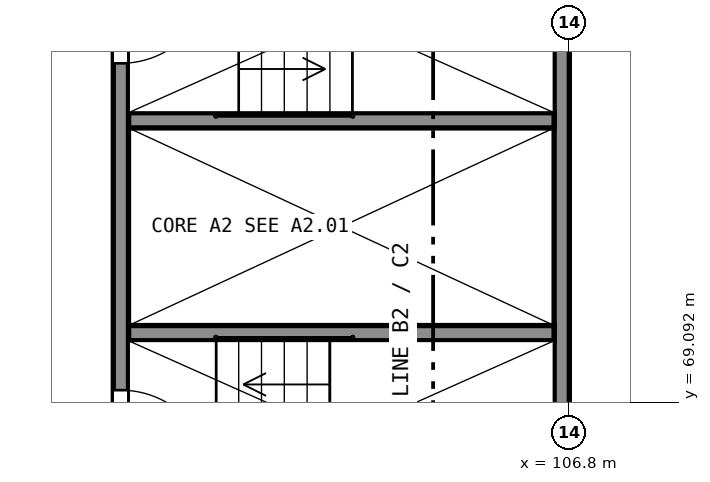
"""IFC4 building model, lengths in metres.
Left out: names, types, materials, properties, quantities, classifications, styles, units other than length and angle.
Written with IfcOpenShell. Run it as: python <this file> out.ifc"""

import sys

from ifc_helpers import new_model, si_unit, direction, frame, frame_2d, origin, place, context, subcontext, project, spatial, rectangle, extrude, element, fill, save


model = new_model("IFC4")
c1 = context("Model", 3, precision=1e-05, world=origin(), true_north=direction((0.0, 1.0)))
c2 = subcontext(c1, "Body", "Model", "MODEL_VIEW")
j1 = project(units=[si_unit("LENGTHUNIT", "METRE"), si_unit("PLANEANGLEUNIT", "RADIAN")], contexts=[c1])
p1 = place(None, origin())
s1 = spatial("IfcSite", under=j1, at=p1, CompositionType="ELEMENT")
p2 = place(p1, origin())
s2 = spatial("IfcBuilding", under=s1, at=p2, CompositionType="ELEMENT")
p3 = place(p2, frame((0.0, 0.0, 25.0)))
s3 = spatial("IfcBuildingStorey", under=s2, at=p3, CompositionType="ELEMENT", Elevation=25.0)
p4 = place(p3, frame((106.7, 67.4, 0.0), z_axis=(0.0, 0.0, 1.0), x_axis=(0.0, 1.0, 0.0)))
e1 = element("IfcWall", 1, at=p4, inside=s3, PredefinedType="SHEAR", context=c2, shape_type="SweptSolid", body=[
    extrude(rectangle(XDim=8.0, YDim=0.2, at=frame_2d((4.0, 0.0))), origin(), (0.0, 0.0, 1.0), 5.0),
])
p5 = place(p3, frame((100.9, 67.4, 0.0), z_axis=(0.0, 0.0, 1.0), x_axis=(0.0, 1.0, 0.0)))
e2 = element("IfcWall", 2, at=p5, inside=s3, PredefinedType="SHEAR", context=c2, shape_type="SweptSolid", body=[
    extrude(rectangle(XDim=8.0, YDim=0.2, at=frame_2d((4.0, 0.0))), origin(), (0.0, 0.0, 1.0), 5.0),
])
p6 = place(p5, frame((0.65, 0.0, 0.0)))
e3 = element("IfcOpeningElement", 3, at=p6, cuts=e2, PredefinedType="OPENING", context=c2, shape_type="SweptSolid", body=[
    extrude(rectangle(XDim=1.2, YDim=2.1, at=frame_2d((0.6, 1.05))), frame((0.0, 0.11, 0.0), z_axis=(0.0, -1.0, 0.0), x_axis=(1.0, 0.0, 0.0)), (0.0, 0.0, 1.0), 0.22),
])
p7 = place(p5, frame((6.15, 0.0, 0.0)))
e4 = element("IfcOpeningElement", 4, at=p7, cuts=e2, PredefinedType="OPENING", context=c2, shape_type="SweptSolid", body=[
    extrude(rectangle(XDim=1.2, YDim=2.1, at=frame_2d((0.6, 1.05))), frame((0.0, 0.11, 0.0), z_axis=(0.0, -1.0, 0.0), x_axis=(1.0, 0.0, 0.0)), (0.0, 0.0, 1.0), 0.22),
])
for number, where, z_axis, x_axis in (
    (5, (101.0, 70.0, 0.0), (0.0, 0.0, 1.0), (1.0, 0.0, 0.0)),
    (6, (101.0, 72.8, 0.0), (0.0, 0.0, 1.0), (1.0, 0.0, 0.0)),
):
    element("IfcWall", number, at=place(p3, frame(where, z_axis=z_axis, x_axis=x_axis)), inside=s3, PredefinedType="SHEAR", context=c2, shape_type="SweptSolid", body=[
        extrude(rectangle(XDim=5.6, YDim=0.2, at=frame_2d((2.8, 0.0))), origin(), (0.0, 0.0, 1.0), 5.0),
    ])
p8 = place(p6, origin())
e7 = element("IfcDoor", 7, at=p8, inside=s3, OperationType="SINGLE_SWING_LEFT", PredefinedType="DOOR", context=c2, shape_type="SweptSolid", body=[
    extrude(rectangle(XDim=1.2, YDim=2.1, at=frame_2d((0.6, 1.05))), frame((0.0, 0.025, 0.0), z_axis=(0.0, -1.0, 0.0), x_axis=(1.0, 0.0, 0.0)), (0.0, 0.0, 1.0), 0.05),
])
fill(e3, e7)
p9 = place(p7, origin())
e8 = element("IfcDoor", 8, at=p9, inside=s3, OperationType="SINGLE_SWING_RIGHT", PredefinedType="DOOR", context=c2, shape_type="SweptSolid", body=[
    extrude(rectangle(XDim=1.2, YDim=2.1, at=frame_2d((0.6, 1.05))), frame((0.0, 0.025, 0.0), z_axis=(0.0, -1.0, 0.0), x_axis=(1.0, 0.0, 0.0)), (0.0, 0.0, 1.0), 0.05),
])
fill(e4, e8)
save(model, sys.argv[1])
